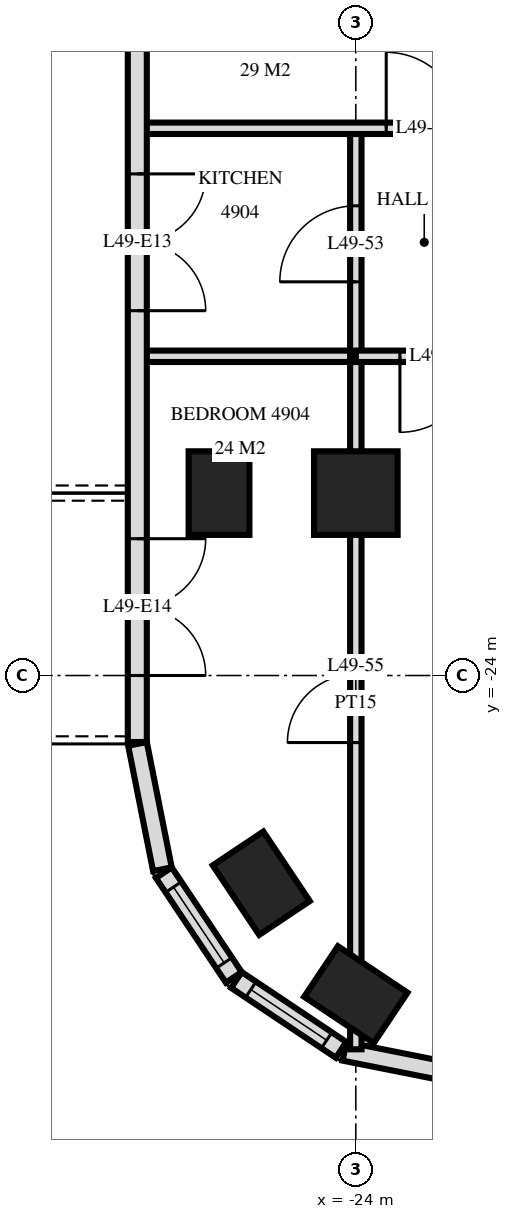
"""IFC4 building model, lengths in metres.
Left out: names, types, materials, properties, quantities, classifications, styles, units other than length and angle.
Written with IfcOpenShell. Run it as: python <this file> out.ifc"""

import sys

from ifc_helpers import new_model, si_unit, direction, frame, frame_2d, origin, origin_2d, place, context, subcontext, project, spatial, rectangle, extrude, element, fill, save


model = new_model("IFC4")
c1 = context("Model", 3, precision=1e-05, world=origin(), true_north=direction((0.0, 1.0)))
c2 = subcontext(c1, "Body", "Model", "MODEL_VIEW")
j1 = project(units=[si_unit("LENGTHUNIT", "METRE"), si_unit("PLANEANGLEUNIT", "RADIAN")], contexts=[c1])
p1 = place(None, origin())
s1 = spatial("IfcSite", under=j1, at=p1, CompositionType="ELEMENT")
p2 = place(p1, origin())
s2 = spatial("IfcBuilding", under=s1, at=p2, CompositionType="ELEMENT")
p3 = place(p2, frame((0.0, 0.0, 190.6)))
s3 = spatial("IfcBuildingStorey", under=s2, at=p3, CompositionType="ELEMENT", Elevation=190.6)
for number, where, z_axis, x_axis in (
    (1, (-25.8, -21.6, 0.0), (0.0, 0.0, 1.0), (0.0, 1.0, 0.0)),
    (2, (-25.244, -26.733, 0.0), (0.0, 0.0, 1.0), (-0.556, 0.831, 0.0)),
    (3, (-24.0, -28.2, 0.0), (0.0, 0.0, 1.0), (-0.831, 0.556, 0.0)),
):
    element("IfcColumn", number, at=place(p3, frame(where, z_axis=z_axis, x_axis=x_axis)), inside=s3, PredefinedType="COLUMN", context=c2, shape_type="SweptSolid", body=[
        extrude(rectangle(XDim=1.1, YDim=0.8, at=origin_2d()), origin(), (0.0, 0.0, 1.0), 3.5),
    ])
p4 = place(p3, frame((-24.0, -21.6, 0.0), z_axis=(0.0, 0.0, 1.0), x_axis=(1.0, 0.0, 0.0)))
e4 = element("IfcColumn", 4, at=p4, inside=s3, PredefinedType="COLUMN", context=c2, shape_type="SweptSolid", body=[
    extrude(rectangle(XDim=1.1, YDim=1.1, at=origin_2d()), origin(), (0.0, 0.0, 1.0), 3.5),
])
p5 = place(p3, frame((-26.875, -3.325, 0.0), z_axis=(0.0, 0.0, 1.0), x_axis=(0.0, -1.0, 0.0)))
e5 = element("IfcWall", 5, at=p5, inside=s3, PredefinedType="SOLIDWALL", context=c2, shape_type="SweptSolid", body=[
    extrude(rectangle(XDim=21.551, YDim=0.25, at=frame_2d((10.775, 0.0))), origin(), (0.0, 0.0, 1.0), 3.22),
])
p6 = place(p5, frame((7.025, 0.0, 0.0)))
e6 = element("IfcOpeningElement", 6, at=p6, cuts=e5, PredefinedType="OPENING", context=c2, shape_type="SweptSolid", body=[
    extrude(rectangle(XDim=1.8, YDim=2.4, at=frame_2d((0.9, 1.2))), frame((0.0, 0.135, 0.0), z_axis=(0.0, -1.0, 0.0), x_axis=(1.0, 0.0, 0.0)), (0.0, 0.0, 1.0), 0.27),
])
p7 = place(p5, frame((14.075, 0.0, 0.0)))
e7 = element("IfcOpeningElement", 7, at=p7, cuts=e5, PredefinedType="OPENING", context=c2, shape_type="SweptSolid", body=[
    extrude(rectangle(XDim=1.8, YDim=2.4, at=frame_2d((0.9, 1.2))), frame((0.0, 0.135, 0.0), z_axis=(0.0, -1.0, 0.0), x_axis=(1.0, 0.0, 0.0)), (0.0, 0.0, 1.0), 0.27),
])
p8 = place(p5, frame((18.875, 0.0, 0.0)))
e8 = element("IfcOpeningElement", 8, at=p8, cuts=e5, PredefinedType="OPENING", context=c2, shape_type="SweptSolid", body=[
    extrude(rectangle(XDim=1.8, YDim=2.4, at=frame_2d((0.9, 1.2))), frame((0.0, 0.135, 0.0), z_axis=(0.0, -1.0, 0.0), x_axis=(1.0, 0.0, 0.0)), (0.0, 0.0, 1.0), 0.27),
])
p9 = place(p3, frame((-26.873, -24.9, 0.0), z_axis=(0.0, 0.0, 1.0), x_axis=(0.195026884138, -0.980797896849, 0.0)))
e9 = element("IfcWall", 9, at=p9, inside=s3, PredefinedType="SOLIDWALL", context=c2, shape_type="SweptSolid", body=[
    extrude(rectangle(XDim=1.681, YDim=0.25, at=frame_2d((0.841, 0.0))), origin(), (0.0, 0.0, 1.0), 3.22),
])
p10 = place(p3, frame((-26.526, -26.594, 0.0), z_axis=(0.0, 0.0, 1.0), x_axis=(0.55555029066, -0.831482937015, 0.0)))
e10 = element("IfcWall", 10, at=p10, inside=s3, PredefinedType="SOLIDWALL", context=c2, shape_type="SweptSolid", body=[
    extrude(rectangle(XDim=1.656, YDim=0.25, at=frame_2d((0.828, 0.0))), origin(), (0.0, 0.0, 1.0), 3.22),
])
p11 = place(p10, frame((0.228, 0.0, 0.9)))
e11 = element("IfcOpeningElement", 11, at=p11, cuts=e10, PredefinedType="OPENING", context=c2, shape_type="SweptSolid", body=[
    extrude(rectangle(XDim=1.2, YDim=1.5, at=frame_2d((0.6, 0.75))), frame((0.0, 0.135, 0.0), z_axis=(0.0, -1.0, 0.0), x_axis=(1.0, 0.0, 0.0)), (0.0, 0.0, 1.0), 0.27),
])
p12 = place(p3, frame((-25.571, -28.006, 0.0), z_axis=(0.0, 0.0, 1.0), x_axis=(0.831482937015, -0.55555029066, 0.0)))
e12 = element("IfcWall", 12, at=p12, inside=s3, PredefinedType="SOLIDWALL", context=c2, shape_type="SweptSolid", body=[
    extrude(rectangle(XDim=1.656, YDim=0.25, at=frame_2d((0.828, 0.0))), origin(), (0.0, 0.0, 1.0), 3.22),
])
p13 = place(p12, frame((0.228, 0.0, 0.9)))
e13 = element("IfcOpeningElement", 13, at=p13, cuts=e12, PredefinedType="OPENING", context=c2, shape_type="SweptSolid", body=[
    extrude(rectangle(XDim=1.2, YDim=1.5, at=frame_2d((0.6, 0.75))), frame((0.0, 0.135, 0.0), z_axis=(0.0, -1.0, 0.0), x_axis=(1.0, 0.0, 0.0)), (0.0, 0.0, 1.0), 0.27),
])
p14 = place(p3, frame((-24.149, -28.945, 0.0), z_axis=(0.0, 0.0, 1.0), x_axis=(0.980775640221, -0.19513878023, 0.0)))
e14 = element("IfcWall", 14, at=p14, inside=s3, PredefinedType="SOLIDWALL", context=c2, shape_type="SweptSolid", body=[
    extrude(rectangle(XDim=1.681, YDim=0.25, at=frame_2d((0.841, 0.0))), origin(), (0.0, 0.0, 1.0), 3.22),
])
p15 = place(p3, frame((-24.0, -19.8, 0.0), z_axis=(0.0, 0.0, 1.0), x_axis=(0.0, 1.0, 0.0)))
e15 = element("IfcWall", 15, at=p15, inside=s3, PredefinedType="PARTITIONING", context=c2, shape_type="SweptSolid", body=[
    extrude(rectangle(XDim=3.0, YDim=0.15, at=frame_2d((1.5, 0.0))), origin(), (0.0, 0.0, 1.0), 3.22),
])
p16 = place(p15, frame((0.98, 0.0, 0.0)))
e16 = element("IfcOpeningElement", 16, at=p16, cuts=e15, PredefinedType="OPENING", context=c2, shape_type="SweptSolid", body=[
    extrude(rectangle(XDim=1.0, YDim=2.1, at=frame_2d((0.5, 1.05))), frame((0.0, 0.085, 0.0), z_axis=(0.0, -1.0, 0.0), x_axis=(1.0, 0.0, 0.0)), (0.0, 0.0, 1.0), 0.17),
])
p17 = place(p3, frame((-24.0, -28.918, 0.0), z_axis=(0.0, 0.0, 1.0), x_axis=(0.0, 1.0, 0.0)))
e17 = element("IfcWall", 17, at=p17, inside=s3, PredefinedType="PARTITIONING", context=c2, shape_type="SweptSolid", body=[
    extrude(rectangle(XDim=9.118, YDim=0.15, at=frame_2d((4.559, 0.0))), origin(), (0.0, 0.0, 1.0), 3.22),
])
p18 = place(p17, frame((4.036, 0.0, 0.0)))
e18 = element("IfcOpeningElement", 18, at=p18, cuts=e17, PredefinedType="OPENING", context=c2, shape_type="SweptSolid", body=[
    extrude(rectangle(XDim=0.9, YDim=2.1, at=frame_2d((0.45, 1.05))), frame((0.0, 0.085, 0.0), z_axis=(0.0, -1.0, 0.0), x_axis=(1.0, 0.0, 0.0)), (0.0, 0.0, 1.0), 0.17),
])
p19 = place(p3, frame((-24.0, -19.8, 0.0), z_axis=(0.0, 0.0, 1.0), x_axis=(1.0, 0.0, 0.0)))
e19 = element("IfcWall", 19, at=p19, inside=s3, PredefinedType="PARTITIONING", context=c2, shape_type="SweptSolid", body=[
    extrude(rectangle(XDim=1.8, YDim=0.15, at=frame_2d((0.9, 0.0))), origin(), (0.0, 0.0, 1.0), 3.22),
])
p20 = place(p19, frame((0.58, 0.0, 0.0)))
e20 = element("IfcOpeningElement", 20, at=p20, cuts=e19, PredefinedType="OPENING", context=c2, shape_type="SweptSolid", body=[
    extrude(rectangle(XDim=1.0, YDim=2.1, at=frame_2d((0.5, 1.05))), frame((0.0, 0.085, 0.0), z_axis=(0.0, -1.0, 0.0), x_axis=(1.0, 0.0, 0.0)), (0.0, 0.0, 1.0), 0.17),
])
p21 = place(p3, frame((-26.82, -19.8, 0.0), z_axis=(0.0, 0.0, 1.0), x_axis=(1.0, 0.0, 0.0)))
e21 = element("IfcWall", 21, at=p21, inside=s3, PredefinedType="PARTITIONING", context=c2, shape_type="SweptSolid", body=[
    extrude(rectangle(XDim=2.82, YDim=0.15, at=frame_2d((1.41, 0.0))), origin(), (0.0, 0.0, 1.0), 3.22),
])
p22 = place(p3, frame((-26.82, -16.8, 0.0), z_axis=(0.0, 0.0, 1.0), x_axis=(1.0, 0.0, 0.0)))
e22 = element("IfcWall", 22, at=p22, inside=s3, PredefinedType="PARTITIONING", context=c2, shape_type="SweptSolid", body=[
    extrude(rectangle(XDim=53.64, YDim=0.15, at=frame_2d((26.82, 0.0))), origin(), (0.0, 0.0, 1.0), 3.22),
])
p23 = place(p22, frame((11.97, 0.0, 0.0)))
e23 = element("IfcOpeningElement", 23, at=p23, cuts=e22, PredefinedType="OPENING", context=c2, shape_type="SweptSolid", body=[
    extrude(rectangle(XDim=1.0, YDim=2.1, at=frame_2d((0.5, 1.05))), frame((0.0, 0.085, 0.0), z_axis=(0.0, -1.0, 0.0), x_axis=(1.0, 0.0, 0.0)), (0.0, 0.0, 1.0), 0.17),
])
p24 = place(p22, frame((10.67, 0.0, 0.0)))
e24 = element("IfcOpeningElement", 24, at=p24, cuts=e22, PredefinedType="OPENING", context=c2, shape_type="SweptSolid", body=[
    extrude(rectangle(XDim=1.0, YDim=2.1, at=frame_2d((0.5, 1.05))), frame((0.0, 0.085, 0.0), z_axis=(0.0, -1.0, 0.0), x_axis=(1.0, 0.0, 0.0)), (0.0, 0.0, 1.0), 0.17),
])
p25 = place(p22, frame((3.22, 0.0, 0.0)))
e25 = element("IfcOpeningElement", 25, at=p25, cuts=e22, PredefinedType="OPENING", context=c2, shape_type="SweptSolid", body=[
    extrude(rectangle(XDim=1.0, YDim=2.1, at=frame_2d((0.5, 1.05))), frame((0.0, 0.085, 0.0), z_axis=(0.0, -1.0, 0.0), x_axis=(1.0, 0.0, 0.0)), (0.0, 0.0, 1.0), 0.17),
])
p26 = place(p22, frame((5.02, 0.0, 0.0)))
e26 = element("IfcOpeningElement", 26, at=p26, cuts=e22, PredefinedType="OPENING", context=c2, shape_type="SweptSolid", body=[
    extrude(rectangle(XDim=1.0, YDim=2.1, at=frame_2d((0.5, 1.05))), frame((0.0, 0.085, 0.0), z_axis=(0.0, -1.0, 0.0), x_axis=(1.0, 0.0, 0.0)), (0.0, 0.0, 1.0), 0.17),
])
p27 = place(p22, frame((38.97, 0.0, 0.0)))
e27 = element("IfcOpeningElement", 27, at=p27, cuts=e22, PredefinedType="OPENING", context=c2, shape_type="SweptSolid", body=[
    extrude(rectangle(XDim=1.0, YDim=2.1, at=frame_2d((0.5, 1.05))), frame((0.0, 0.085, 0.0), z_axis=(0.0, -1.0, 0.0), x_axis=(1.0, 0.0, 0.0)), (0.0, 0.0, 1.0), 0.17),
])
p28 = place(p22, frame((48.72, 0.0, 0.0)))
e28 = element("IfcOpeningElement", 28, at=p28, cuts=e22, PredefinedType="OPENING", context=c2, shape_type="SweptSolid", body=[
    extrude(rectangle(XDim=1.0, YDim=2.1, at=frame_2d((0.5, 1.05))), frame((0.0, 0.085, 0.0), z_axis=(0.0, -1.0, 0.0), x_axis=(1.0, 0.0, 0.0)), (0.0, 0.0, 1.0), 0.17),
])
p29 = place(p22, frame((46.92, 0.0, 0.0)))
e29 = element("IfcOpeningElement", 29, at=p29, cuts=e22, PredefinedType="OPENING", context=c2, shape_type="SweptSolid", body=[
    extrude(rectangle(XDim=1.0, YDim=2.1, at=frame_2d((0.5, 1.05))), frame((0.0, 0.085, 0.0), z_axis=(0.0, -1.0, 0.0), x_axis=(1.0, 0.0, 0.0)), (0.0, 0.0, 1.0), 0.17),
])
p30 = place(p22, frame((18.32, 0.0, 0.0)))
e30 = element("IfcOpeningElement", 30, at=p30, cuts=e22, PredefinedType="OPENING", context=c2, shape_type="SweptSolid", body=[
    extrude(rectangle(XDim=1.0, YDim=2.1, at=frame_2d((0.5, 1.05))), frame((0.0, 0.085, 0.0), z_axis=(0.0, -1.0, 0.0), x_axis=(1.0, 0.0, 0.0)), (0.0, 0.0, 1.0), 0.17),
])
p31 = place(p22, frame((26.32, 0.0, 0.0)))
e31 = element("IfcOpeningElement", 31, at=p31, cuts=e22, PredefinedType="OPENING", context=c2, shape_type="SweptSolid", body=[
    extrude(rectangle(XDim=1.0, YDim=2.1, at=frame_2d((0.5, 1.05))), frame((0.0, 0.085, 0.0), z_axis=(0.0, -1.0, 0.0), x_axis=(1.0, 0.0, 0.0)), (0.0, 0.0, 1.0), 0.17),
])
p32 = place(p22, frame((34.32, 0.0, 0.0)))
e32 = element("IfcOpeningElement", 32, at=p32, cuts=e22, PredefinedType="OPENING", context=c2, shape_type="SweptSolid", body=[
    extrude(rectangle(XDim=1.0, YDim=2.1, at=frame_2d((0.5, 1.05))), frame((0.0, 0.085, 0.0), z_axis=(0.0, -1.0, 0.0), x_axis=(1.0, 0.0, 0.0)), (0.0, 0.0, 1.0), 0.17),
])
p33 = place(p11, origin())
e33 = element("IfcWindow", 33, at=p33, inside=s3, PartitioningType="SINGLE_PANEL", PredefinedType="WINDOW", context=c2, shape_type="SweptSolid", body=[
    extrude(rectangle(XDim=1.2, YDim=1.5, at=frame_2d((0.6, 0.75))), frame((0.0, 0.03, 0.0), z_axis=(0.0, -1.0, 0.0), x_axis=(1.0, 0.0, 0.0)), (0.0, 0.0, 1.0), 0.06),
])
fill(e11, e33)
p34 = place(p13, origin())
e34 = element("IfcWindow", 34, at=p34, inside=s3, PartitioningType="SINGLE_PANEL", PredefinedType="WINDOW", context=c2, shape_type="SweptSolid", body=[
    extrude(rectangle(XDim=1.2, YDim=1.5, at=frame_2d((0.6, 0.75))), frame((0.0, 0.03, 0.0), z_axis=(0.0, -1.0, 0.0), x_axis=(1.0, 0.0, 0.0)), (0.0, 0.0, 1.0), 0.06),
])
fill(e13, e34)
p35 = place(p7, origin())
e35 = element("IfcDoor", 35, at=p35, inside=s3, OperationType="DOUBLE_DOOR_SINGLE_SWING", PredefinedType="DOOR", context=c2, shape_type="SweptSolid", body=[
    extrude(rectangle(XDim=1.8, YDim=2.4, at=frame_2d((0.9, 1.2))), frame((0.0, 0.025, 0.0), z_axis=(0.0, -1.0, 0.0), x_axis=(1.0, 0.0, 0.0)), (0.0, 0.0, 1.0), 0.05),
])
fill(e7, e35)
p36 = place(p8, origin())
e36 = element("IfcDoor", 36, at=p36, inside=s3, OperationType="DOUBLE_DOOR_SINGLE_SWING", PredefinedType="DOOR", context=c2, shape_type="SweptSolid", body=[
    extrude(rectangle(XDim=1.8, YDim=2.4, at=frame_2d((0.9, 1.2))), frame((0.0, 0.025, 0.0), z_axis=(0.0, -1.0, 0.0), x_axis=(1.0, 0.0, 0.0)), (0.0, 0.0, 1.0), 0.05),
])
fill(e8, e36)
p37 = place(p25, origin())
e37 = element("IfcDoor", 37, at=p37, inside=s3, OperationType="SINGLE_SWING_RIGHT", PredefinedType="DOOR", context=c2, shape_type="SweptSolid", body=[
    extrude(rectangle(XDim=1.0, YDim=2.1, at=frame_2d((0.5, 1.05))), frame((0.0, 0.025, 0.0), z_axis=(0.0, -1.0, 0.0), x_axis=(1.0, 0.0, 0.0)), (0.0, 0.0, 1.0), 0.05),
])
fill(e25, e37)
p38 = place(p16, origin())
e38 = element("IfcDoor", 38, at=p38, inside=s3, OperationType="SINGLE_SWING_RIGHT", PredefinedType="DOOR", context=c2, shape_type="SweptSolid", body=[
    extrude(rectangle(XDim=1.0, YDim=2.1, at=frame_2d((0.5, 1.05))), frame((0.0, 0.025, 0.0), z_axis=(0.0, -1.0, 0.0), x_axis=(1.0, 0.0, 0.0)), (0.0, 0.0, 1.0), 0.05),
])
fill(e16, e38)
p39 = place(p20, frame((0.5, 0.0, 0.0), z_axis=(0.0, 0.0, 1.0), x_axis=(-1.0, 0.0, 0.0)))
e39 = element("IfcDoor", 39, at=p39, inside=s3, OperationType="SINGLE_SWING_LEFT", PredefinedType="DOOR", context=c2, shape_type="SweptSolid", body=[
    extrude(rectangle(XDim=1.0, YDim=2.1, at=frame_2d((0.0, 1.05))), frame((0.0, -0.025, 0.0), z_axis=(0.0, 1.0, 0.0), x_axis=(-1.0, 0.0, 0.0)), (0.0, 0.0, 1.0), 0.05),
])
fill(e20, e39)
p40 = place(p18, origin())
e40 = element("IfcDoor", 40, at=p40, inside=s3, OperationType="SINGLE_SWING_RIGHT", PredefinedType="DOOR", context=c2, shape_type="SweptSolid", body=[
    extrude(rectangle(XDim=0.9, YDim=2.1, at=frame_2d((0.45, 1.05))), frame((0.0, 0.025, 0.0), z_axis=(0.0, -1.0, 0.0), x_axis=(1.0, 0.0, 0.0)), (0.0, 0.0, 1.0), 0.05),
])
fill(e18, e40)
save(model, sys.argv[1])
